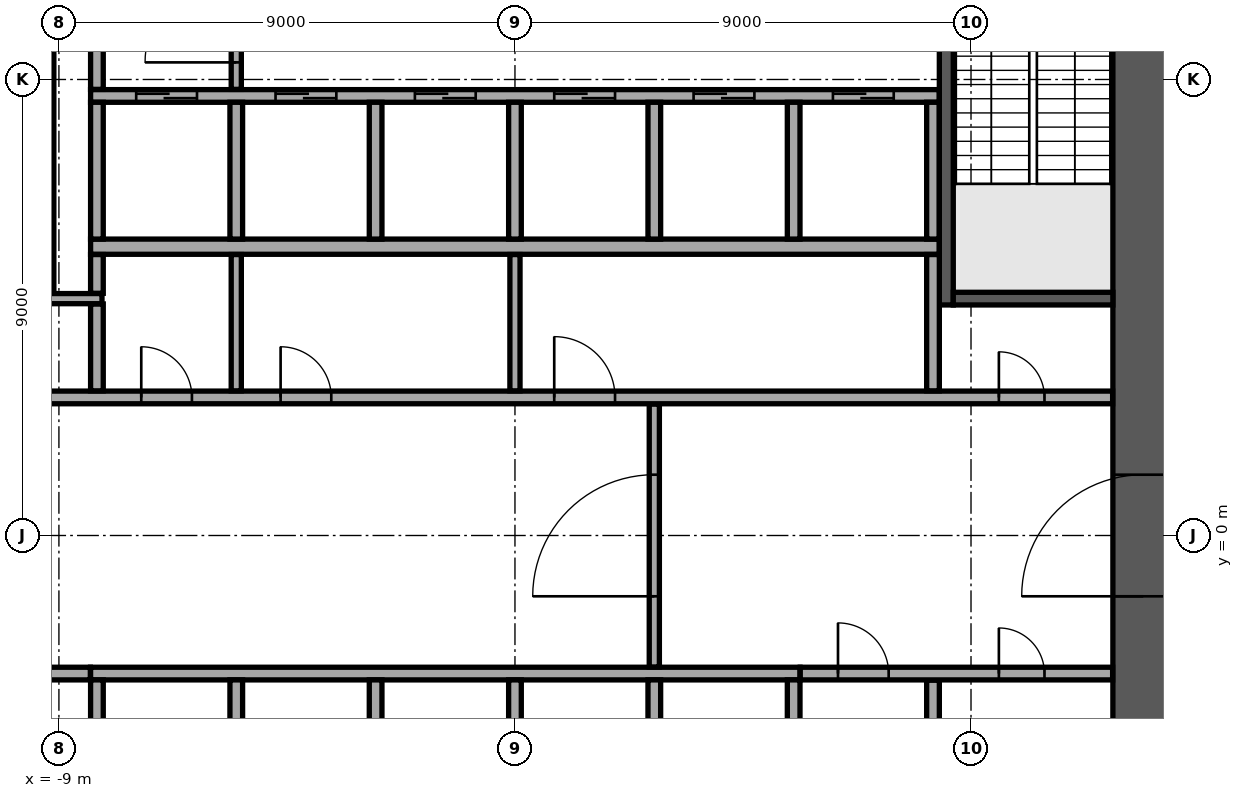
"""IFC4 building model, lengths in metres.
Left out: names, types, materials, properties, quantities, classifications, styles, units other than length and angle.
Written with IfcOpenShell. Run it as: python <this file> out.ifc"""

import sys

from ifc_helpers import new_model, si_unit, direction, frame, frame_2d, origin, place, context, subcontext, project, spatial, rectangle, extrude, element, fill, save


model = new_model("IFC4")
c1 = context("Model", 3, precision=1e-05, world=origin(), true_north=direction((0.0, 1.0)))
c2 = subcontext(c1, "Body", "Model", "MODEL_VIEW")
j1 = project(units=[si_unit("LENGTHUNIT", "METRE"), si_unit("PLANEANGLEUNIT", "RADIAN")], contexts=[c1])
p1 = place(None, origin())
s1 = spatial("IfcSite", under=j1, at=p1, CompositionType="ELEMENT")
p2 = place(p1, origin())
s2 = spatial("IfcBuilding", under=s1, at=p2, CompositionType="ELEMENT")
p3 = place(p2, frame((0.0, 0.0, 27.3)))
s3 = spatial("IfcBuildingStorey", under=s2, at=p3, CompositionType="ELEMENT", Elevation=27.3)
p4 = place(p3, frame((12.4, -11.8, 0.0), z_axis=(0.0, 0.0, 1.0), x_axis=(0.0, 1.0, 0.0)))
e1 = element("IfcWall", 1, at=p4, inside=s3, PredefinedType="SHEAR", context=c2, shape_type="SweptSolid", body=[
    extrude(rectangle(XDim=23.6, YDim=1.2, at=frame_2d((11.8, 0.0))), origin(), (0.0, 0.0, 1.0), 4.35),
])
p5 = place(p4, frame((10.6, 0.0, 0.0)))
e2 = element("IfcOpeningElement", 2, at=p5, cuts=e1, PredefinedType="OPENING", context=c2, shape_type="SweptSolid", body=[
    extrude(rectangle(XDim=2.4, YDim=2.4, at=frame_2d((1.2, 1.2))), frame((0.0, 0.61, 0.0), z_axis=(0.0, -1.0, 0.0), x_axis=(1.0, 0.0, 0.0)), (0.0, 0.0, 1.0), 1.22),
])
p6 = place(p3, frame((-8.375, 5.7, 0.0), z_axis=(0.0, 0.0, 1.0), x_axis=(1.0, 0.0, 0.0)))
e3 = element("IfcWall", 3, at=p6, inside=s3, PredefinedType="SOLIDWALL", context=c2, shape_type="SweptSolid", body=[
    extrude(rectangle(XDim=16.75, YDim=0.3, at=frame_2d((8.375, 0.0))), origin(), (0.0, 0.0, 1.0), 4.35),
])
p7 = place(p3, frame((-8.375, 8.675, 0.0), z_axis=(0.0, 0.0, 1.0), x_axis=(1.0, 0.0, 0.0)))
e4 = element("IfcWall", 4, at=p7, inside=s3, PredefinedType="SOLIDWALL", context=c2, shape_type="SweptSolid", body=[
    extrude(rectangle(XDim=16.75, YDim=0.25, at=frame_2d((8.375, 0.0))), origin(), (0.0, 0.0, 1.0), 4.35),
])
p8 = place(p7, frame((0.9, 0.0, 0.0)))
e5 = element("IfcOpeningElement", 5, at=p8, cuts=e4, PredefinedType="OPENING", context=c2, shape_type="SweptSolid", body=[
    extrude(rectangle(XDim=1.2, YDim=2.1, at=frame_2d((0.6, 1.05))), frame((0.0, 0.135, 0.0), z_axis=(0.0, -1.0, 0.0), x_axis=(1.0, 0.0, 0.0)), (0.0, 0.0, 1.0), 0.27),
])
p9 = place(p7, frame((3.65, 0.0, 0.0)))
e6 = element("IfcOpeningElement", 6, at=p9, cuts=e4, PredefinedType="OPENING", context=c2, shape_type="SweptSolid", body=[
    extrude(rectangle(XDim=1.2, YDim=2.1, at=frame_2d((0.6, 1.05))), frame((0.0, 0.135, 0.0), z_axis=(0.0, -1.0, 0.0), x_axis=(1.0, 0.0, 0.0)), (0.0, 0.0, 1.0), 0.27),
])
p10 = place(p7, frame((6.4, 0.0, 0.0)))
e7 = element("IfcOpeningElement", 7, at=p10, cuts=e4, PredefinedType="OPENING", context=c2, shape_type="SweptSolid", body=[
    extrude(rectangle(XDim=1.2, YDim=2.1, at=frame_2d((0.6, 1.05))), frame((0.0, 0.135, 0.0), z_axis=(0.0, -1.0, 0.0), x_axis=(1.0, 0.0, 0.0)), (0.0, 0.0, 1.0), 0.27),
])
p11 = place(p7, frame((9.15, 0.0, 0.0)))
e8 = element("IfcOpeningElement", 8, at=p11, cuts=e4, PredefinedType="OPENING", context=c2, shape_type="SweptSolid", body=[
    extrude(rectangle(XDim=1.2, YDim=2.1, at=frame_2d((0.6, 1.05))), frame((0.0, 0.135, 0.0), z_axis=(0.0, -1.0, 0.0), x_axis=(1.0, 0.0, 0.0)), (0.0, 0.0, 1.0), 0.27),
])
p12 = place(p7, frame((11.9, 0.0, 0.0)))
e9 = element("IfcOpeningElement", 9, at=p12, cuts=e4, PredefinedType="OPENING", context=c2, shape_type="SweptSolid", body=[
    extrude(rectangle(XDim=1.2, YDim=2.1, at=frame_2d((0.6, 1.05))), frame((0.0, 0.135, 0.0), z_axis=(0.0, -1.0, 0.0), x_axis=(1.0, 0.0, 0.0)), (0.0, 0.0, 1.0), 0.27),
])
p13 = place(p7, frame((14.65, 0.0, 0.0)))
e10 = element("IfcOpeningElement", 10, at=p13, cuts=e4, PredefinedType="OPENING", context=c2, shape_type="SweptSolid", body=[
    extrude(rectangle(XDim=1.2, YDim=2.1, at=frame_2d((0.6, 1.05))), frame((0.0, 0.135, 0.0), z_axis=(0.0, -1.0, 0.0), x_axis=(1.0, 0.0, 0.0)), (0.0, 0.0, 1.0), 0.27),
])
for number, where, z_axis, x_axis in (
    (11, (-8.25, 5.85, 0.0), (0.0, 0.0, 1.0), (0.0, 1.0, 0.0)),
    (12, (-5.5, 5.85, 0.0), (0.0, 0.0, 1.0), (0.0, 1.0, 0.0)),
    (13, (-2.75, 5.85, 0.0), (0.0, 0.0, 1.0), (0.0, 1.0, 0.0)),
    (14, (0.0, 5.85, 0.0), (0.0, 0.0, 1.0), (0.0, 1.0, 0.0)),
    (15, (2.75, 5.85, 0.0), (0.0, 0.0, 1.0), (0.0, 1.0, 0.0)),
    (16, (5.5, 5.85, 0.0), (0.0, 0.0, 1.0), (0.0, 1.0, 0.0)),
    (17, (8.25, 5.85, 0.0), (0.0, 0.0, 1.0), (0.0, 1.0, 0.0)),
):
    element("IfcWall", number, at=place(p3, frame(where, z_axis=z_axis, x_axis=x_axis)), inside=s3, PredefinedType="SOLIDWALL", context=c2, shape_type="SweptSolid", body=[
        extrude(rectangle(XDim=2.7, YDim=0.25, at=frame_2d((1.35, 0.0))), origin(), (0.0, 0.0, 1.0), 4.35),
    ])
p14 = place(p3, frame((-8.375, -2.725, 0.0), z_axis=(0.0, 0.0, 1.0), x_axis=(1.0, 0.0, 0.0)))
e18 = element("IfcWall", 18, at=p14, inside=s3, PredefinedType="SOLIDWALL", context=c2, shape_type="SweptSolid", body=[
    extrude(rectangle(XDim=14.0, YDim=0.25, at=frame_2d((7.0, 0.0))), origin(), (0.0, 0.0, 1.0), 4.35),
])
for number, where, z_axis, x_axis in (
    (19, (-8.25, -5.55, 0.0), (0.0, 0.0, 1.0), (0.0, 1.0, 0.0)),
    (20, (-5.5, -5.55, 0.0), (0.0, 0.0, 1.0), (0.0, 1.0, 0.0)),
    (21, (-2.75, -5.55, 0.0), (0.0, 0.0, 1.0), (0.0, 1.0, 0.0)),
    (22, (0.0, -5.55, 0.0), (0.0, 0.0, 1.0), (0.0, 1.0, 0.0)),
    (23, (2.75, -5.55, 0.0), (0.0, 0.0, 1.0), (0.0, 1.0, 0.0)),
    (24, (5.5, -5.55, 0.0), (0.0, 0.0, 1.0), (0.0, 1.0, 0.0)),
):
    element("IfcWall", number, at=place(p3, frame(where, z_axis=z_axis, x_axis=x_axis)), inside=s3, PredefinedType="SOLIDWALL", context=c2, shape_type="SweptSolid", body=[
        extrude(rectangle(XDim=2.7, YDim=0.25, at=frame_2d((1.35, 0.0))), origin(), (0.0, 0.0, 1.0), 4.35),
    ])
p15 = place(p3, frame((8.512, 4.55, 0.0), z_axis=(0.0, 0.0, 1.0), x_axis=(0.0, 1.0, 0.0)))
e25 = element("IfcWall", 25, at=p15, inside=s3, PredefinedType="SOLIDWALL", context=c2, shape_type="SweptSolid", body=[
    extrude(rectangle(XDim=7.25, YDim=0.275, at=frame_2d((3.625, 0.0))), origin(), (0.0, 0.0, 1.0), 4.35),
])
p16 = place(p15, frame((6.0, 0.0, 0.0)))
e26 = element("IfcOpeningElement", 26, at=p16, cuts=e25, PredefinedType="OPENING", context=c2, shape_type="SweptSolid", body=[
    extrude(rectangle(XDim=1.0, YDim=2.1, at=frame_2d((0.5, 1.05))), frame((0.0, 0.147, 0.0), z_axis=(0.0, -1.0, 0.0), x_axis=(1.0, 0.0, 0.0)), (0.0, 0.0, 1.0), 0.295),
])
p17 = place(p3, frame((8.65, 4.675, 0.0), z_axis=(0.0, 0.0, 1.0), x_axis=(1.0, 0.0, 0.0)))
e27 = element("IfcWall", 27, at=p17, inside=s3, PredefinedType="SOLIDWALL", context=c2, shape_type="SweptSolid", body=[
    extrude(rectangle(XDim=3.15, YDim=0.25, at=frame_2d((1.575, 0.0))), origin(), (0.0, 0.0, 1.0), 4.35),
])
p18 = place(p3, frame((8.25, -5.545, 0.0), z_axis=(0.0, 0.0, 1.0), x_axis=(0.0, 1.0, 0.0)))
e28 = element("IfcWall", 28, at=p18, inside=s3, PredefinedType="PARTITIONING", context=c2, shape_type="SweptSolid", body=[
    extrude(rectangle(XDim=2.69, YDim=0.25, at=frame_2d((1.345, 0.0))), origin(), (0.0, 0.0, 1.0), 4.35),
])
p19 = place(p3, frame((-11.795, -2.725, 0.0), z_axis=(0.0, 0.0, 1.0), x_axis=(1.0, 0.0, 0.0)))
e29 = element("IfcWall", 29, at=p19, inside=s3, PredefinedType="PARTITIONING", context=c2, shape_type="SweptSolid", body=[
    extrude(rectangle(XDim=3.415, YDim=0.25, at=frame_2d((1.708, 0.0))), origin(), (0.0, 0.0, 1.0), 4.35),
])
p20 = place(p19, frame((1.295, 0.0, 0.0)))
e30 = element("IfcOpeningElement", 30, at=p20, cuts=e29, PredefinedType="OPENING", context=c2, shape_type="SweptSolid", body=[
    extrude(rectangle(XDim=1.0, YDim=2.1, at=frame_2d((0.5, 1.05))), frame((0.0, 0.135, 0.0), z_axis=(0.0, -1.0, 0.0), x_axis=(1.0, 0.0, 0.0)), (0.0, 0.0, 1.0), 0.27),
])
p21 = place(p3, frame((5.63, -2.725, 0.0), z_axis=(0.0, 0.0, 1.0), x_axis=(1.0, 0.0, 0.0)))
e31 = element("IfcWall", 31, at=p21, inside=s3, PredefinedType="PARTITIONING", context=c2, shape_type="SweptSolid", body=[
    extrude(rectangle(XDim=6.165, YDim=0.25, at=frame_2d((3.083, 0.0))), origin(), (0.0, 0.0, 1.0), 4.35),
])
p22 = place(p21, frame((0.745, 0.0, 0.0)))
e32 = element("IfcOpeningElement", 32, at=p22, cuts=e31, PredefinedType="OPENING", context=c2, shape_type="SweptSolid", body=[
    extrude(rectangle(XDim=1.0, YDim=2.1, at=frame_2d((0.5, 1.05))), frame((0.0, 0.135, 0.0), z_axis=(0.0, -1.0, 0.0), x_axis=(1.0, 0.0, 0.0)), (0.0, 0.0, 1.0), 0.27),
])
p23 = place(p21, frame((3.92, 0.0, 0.0)))
e33 = element("IfcOpeningElement", 33, at=p23, cuts=e31, PredefinedType="OPENING", context=c2, shape_type="SweptSolid", body=[
    extrude(rectangle(XDim=0.9, YDim=2.1, at=frame_2d((0.45, 1.05))), frame((0.0, 0.135, 0.0), z_axis=(0.0, -1.0, 0.0), x_axis=(1.0, 0.0, 0.0)), (0.0, 0.0, 1.0), 0.27),
])
p24 = place(p3, frame((2.75, -2.595, 0.0), z_axis=(0.0, 0.0, 1.0), x_axis=(0.0, 1.0, 0.0)))
e34 = element("IfcWall", 34, at=p24, inside=s3, PredefinedType="PARTITIONING", context=c2, shape_type="SweptSolid", body=[
    extrude(rectangle(XDim=5.19, YDim=0.2, at=frame_2d((2.595, 0.0))), origin(), (0.0, 0.0, 1.0), 4.35),
])
p25 = place(p24, frame((1.395, 0.0, 0.0)))
e35 = element("IfcOpeningElement", 35, at=p25, cuts=e34, PredefinedType="OPENING", context=c2, shape_type="SweptSolid", body=[
    extrude(rectangle(XDim=2.4, YDim=2.4, at=frame_2d((1.2, 1.2))), frame((0.0, 0.11, 0.0), z_axis=(0.0, -1.0, 0.0), x_axis=(1.0, 0.0, 0.0)), (0.0, 0.0, 1.0), 0.22),
])
p26 = place(p3, frame((-11.795, 2.725, 0.0), z_axis=(0.0, 0.0, 1.0), x_axis=(1.0, 0.0, 0.0)))
e36 = element("IfcWall", 36, at=p26, inside=s3, PredefinedType="PARTITIONING", context=c2, shape_type="SweptSolid", body=[
    extrude(rectangle(XDim=23.59, YDim=0.25, at=frame_2d((11.795, 0.0))), origin(), (0.0, 0.0, 1.0), 4.35),
])
p27 = place(p26, frame((21.345, 0.0, 0.0)))
e37 = element("IfcOpeningElement", 37, at=p27, cuts=e36, PredefinedType="OPENING", context=c2, shape_type="SweptSolid", body=[
    extrude(rectangle(XDim=0.9, YDim=2.1, at=frame_2d((0.45, 1.05))), frame((0.0, 0.135, 0.0), z_axis=(0.0, -1.0, 0.0), x_axis=(1.0, 0.0, 0.0)), (0.0, 0.0, 1.0), 0.27),
])
p28 = place(p26, frame((1.345, 0.0, 0.0)))
e38 = element("IfcOpeningElement", 38, at=p28, cuts=e36, PredefinedType="OPENING", context=c2, shape_type="SweptSolid", body=[
    extrude(rectangle(XDim=0.9, YDim=2.1, at=frame_2d((0.45, 1.05))), frame((0.0, 0.135, 0.0), z_axis=(0.0, -1.0, 0.0), x_axis=(1.0, 0.0, 0.0)), (0.0, 0.0, 1.0), 0.27),
])
p29 = place(p26, frame((4.42, 0.0, 0.0)))
e39 = element("IfcOpeningElement", 39, at=p29, cuts=e36, PredefinedType="OPENING", context=c2, shape_type="SweptSolid", body=[
    extrude(rectangle(XDim=1.0, YDim=2.1, at=frame_2d((0.5, 1.05))), frame((0.0, 0.135, 0.0), z_axis=(0.0, -1.0, 0.0), x_axis=(1.0, 0.0, 0.0)), (0.0, 0.0, 1.0), 0.27),
])
p30 = place(p26, frame((7.17, 0.0, 0.0)))
e40 = element("IfcOpeningElement", 40, at=p30, cuts=e36, PredefinedType="OPENING", context=c2, shape_type="SweptSolid", body=[
    extrude(rectangle(XDim=1.0, YDim=2.1, at=frame_2d((0.5, 1.05))), frame((0.0, 0.135, 0.0), z_axis=(0.0, -1.0, 0.0), x_axis=(1.0, 0.0, 0.0)), (0.0, 0.0, 1.0), 0.27),
])
p31 = place(p26, frame((12.57, 0.0, 0.0)))
e41 = element("IfcOpeningElement", 41, at=p31, cuts=e36, PredefinedType="OPENING", context=c2, shape_type="SweptSolid", body=[
    extrude(rectangle(XDim=1.2, YDim=2.1, at=frame_2d((0.6, 1.05))), frame((0.0, 0.135, 0.0), z_axis=(0.0, -1.0, 0.0), x_axis=(1.0, 0.0, 0.0)), (0.0, 0.0, 1.0), 0.27),
])
p32 = place(p3, frame((-8.25, 2.855, 0.0), z_axis=(0.0, 0.0, 1.0), x_axis=(0.0, 1.0, 0.0)))
e42 = element("IfcWall", 42, at=p32, inside=s3, PredefinedType="PARTITIONING", context=c2, shape_type="SweptSolid", body=[
    extrude(rectangle(XDim=1.715, YDim=0.25, at=frame_2d((0.857, 0.0))), origin(), (0.0, 0.0, 1.0), 4.35),
])
for number, where, z_axis, x_axis in (
    (43, (-5.5, 2.855, 0.0), (0.0, 0.0, 1.0), (0.0, 1.0, 0.0)),
    (44, (0.0, 2.855, 0.0), (0.0, 0.0, 1.0), (0.0, 1.0, 0.0)),
):
    element("IfcWall", number, at=place(p3, frame(where, z_axis=z_axis, x_axis=x_axis)), inside=s3, PredefinedType="PARTITIONING", context=c2, shape_type="SweptSolid", body=[
        extrude(rectangle(XDim=2.69, YDim=0.2, at=frame_2d((1.345, 0.0))), origin(), (0.0, 0.0, 1.0), 4.35),
    ])
p33 = place(p3, frame((8.25, 2.855, 0.0), z_axis=(0.0, 0.0, 1.0), x_axis=(0.0, 1.0, 0.0)))
e45 = element("IfcWall", 45, at=p33, inside=s3, PredefinedType="PARTITIONING", context=c2, shape_type="SweptSolid", body=[
    extrude(rectangle(XDim=2.69, YDim=0.25, at=frame_2d((1.345, 0.0))), origin(), (0.0, 0.0, 1.0), 4.35),
])
p34 = place(p3, frame((-11.795, 4.675, 0.0), z_axis=(0.0, 0.0, 1.0), x_axis=(1.0, 0.0, 0.0)))
e46 = element("IfcWall", 46, at=p34, inside=s3, PredefinedType="PARTITIONING", context=c2, shape_type="SweptSolid", body=[
    extrude(rectangle(XDim=3.645, YDim=0.2, at=frame_2d((1.823, 0.0))), origin(), (0.0, 0.0, 1.0), 4.35),
])
p35 = place(p3, frame((-9.2, 4.78, 0.0), z_axis=(0.0, 0.0, 1.0), x_axis=(0.0, 1.0, 0.0)))
e47 = element("IfcWall", 47, at=p35, inside=s3, PredefinedType="PARTITIONING", context=c2, shape_type="SweptSolid", body=[
    extrude(rectangle(XDim=7.015, YDim=0.2, at=frame_2d((3.507, 0.0))), origin(), (0.0, 0.0, 1.0), 4.35),
])
p36 = place(p35, frame((2.92, 0.0, 0.0)))
e48 = element("IfcOpeningElement", 48, at=p36, cuts=e47, PredefinedType="OPENING", context=c2, shape_type="SweptSolid", body=[
    extrude(rectangle(XDim=1.0, YDim=2.1, at=frame_2d((0.5, 1.05))), frame((0.0, 0.11, 0.0), z_axis=(0.0, -1.0, 0.0), x_axis=(1.0, 0.0, 0.0)), (0.0, 0.0, 1.0), 0.22),
])
p37 = place(p3, frame((-8.25, 4.78, 0.0), z_axis=(0.0, 0.0, 1.0), x_axis=(0.0, 1.0, 0.0)))
e49 = element("IfcWall", 49, at=p37, inside=s3, PredefinedType="PARTITIONING", context=c2, shape_type="SweptSolid", body=[
    extrude(rectangle(XDim=0.765, YDim=0.25, at=frame_2d((0.382, 0.0))), origin(), (0.0, 0.0, 1.0), 4.35),
])
p38 = place(p3, frame((-8.25, 8.805, 0.0), z_axis=(0.0, 0.0, 1.0), x_axis=(0.0, 1.0, 0.0)))
e50 = element("IfcWall", 50, at=p38, inside=s3, PredefinedType="PARTITIONING", context=c2, shape_type="SweptSolid", body=[
    extrude(rectangle(XDim=2.99, YDim=0.25, at=frame_2d((1.495, 0.0))), origin(), (0.0, 0.0, 1.0), 4.35),
])
p39 = place(p38, frame((0.895, 0.0, 0.0)))
e51 = element("IfcOpeningElement", 51, at=p39, cuts=e50, PredefinedType="OPENING", context=c2, shape_type="SweptSolid", body=[
    extrude(rectangle(XDim=1.0, YDim=2.1, at=frame_2d((0.5, 1.05))), frame((0.0, 0.135, 0.0), z_axis=(0.0, -1.0, 0.0), x_axis=(1.0, 0.0, 0.0)), (0.0, 0.0, 1.0), 0.27),
])
p40 = place(p3, frame((-5.5, 8.805, 0.0), z_axis=(0.0, 0.0, 1.0), x_axis=(0.0, 1.0, 0.0)))
e52 = element("IfcWall", 52, at=p40, inside=s3, PredefinedType="PARTITIONING", context=c2, shape_type="SweptSolid", body=[
    extrude(rectangle(XDim=2.99, YDim=0.2, at=frame_2d((1.495, 0.0))), origin(), (0.0, 0.0, 1.0), 4.35),
])
p41 = place(p40, frame((0.532, 0.0, 0.0)))
e53 = element("IfcOpeningElement", 53, at=p41, cuts=e52, PredefinedType="OPENING", context=c2, shape_type="SweptSolid", body=[
    extrude(rectangle(XDim=1.8, YDim=2.1, at=frame_2d((0.9, 1.05))), frame((0.0, 0.11, 0.0), z_axis=(0.0, -1.0, 0.0), x_axis=(1.0, 0.0, 0.0)), (0.0, 0.0, 1.0), 0.22),
])
p42 = place(p5, origin())
e54 = element("IfcDoor", 54, at=p42, inside=s3, OperationType="SINGLE_SWING_LEFT", PredefinedType="DOOR", context=c2, shape_type="SweptSolid", body=[
    extrude(rectangle(XDim=2.4, YDim=2.4, at=frame_2d((1.2, 1.2))), frame((0.0, 0.025, 0.0), z_axis=(0.0, -1.0, 0.0), x_axis=(1.0, 0.0, 0.0)), (0.0, 0.0, 1.0), 0.05),
])
fill(e2, e54)
p43 = place(p8, origin())
e55 = element("IfcDoor", 55, at=p43, inside=s3, OperationType="DOUBLE_DOOR_SLIDING", PredefinedType="DOOR", context=c2, shape_type="SweptSolid", body=[
    extrude(rectangle(XDim=1.2, YDim=2.1, at=frame_2d((0.6, 1.05))), frame((0.0, 0.025, 0.0), z_axis=(0.0, -1.0, 0.0), x_axis=(1.0, 0.0, 0.0)), (0.0, 0.0, 1.0), 0.05),
])
fill(e5, e55)
p44 = place(p9, origin())
e56 = element("IfcDoor", 56, at=p44, inside=s3, OperationType="DOUBLE_DOOR_SLIDING", PredefinedType="DOOR", context=c2, shape_type="SweptSolid", body=[
    extrude(rectangle(XDim=1.2, YDim=2.1, at=frame_2d((0.6, 1.05))), frame((0.0, 0.025, 0.0), z_axis=(0.0, -1.0, 0.0), x_axis=(1.0, 0.0, 0.0)), (0.0, 0.0, 1.0), 0.05),
])
fill(e6, e56)
p45 = place(p10, origin())
e57 = element("IfcDoor", 57, at=p45, inside=s3, OperationType="DOUBLE_DOOR_SLIDING", PredefinedType="DOOR", context=c2, shape_type="SweptSolid", body=[
    extrude(rectangle(XDim=1.2, YDim=2.1, at=frame_2d((0.6, 1.05))), frame((0.0, 0.025, 0.0), z_axis=(0.0, -1.0, 0.0), x_axis=(1.0, 0.0, 0.0)), (0.0, 0.0, 1.0), 0.05),
])
fill(e7, e57)
p46 = place(p11, origin())
e58 = element("IfcDoor", 58, at=p46, inside=s3, OperationType="DOUBLE_DOOR_SLIDING", PredefinedType="DOOR", context=c2, shape_type="SweptSolid", body=[
    extrude(rectangle(XDim=1.2, YDim=2.1, at=frame_2d((0.6, 1.05))), frame((0.0, 0.025, 0.0), z_axis=(0.0, -1.0, 0.0), x_axis=(1.0, 0.0, 0.0)), (0.0, 0.0, 1.0), 0.05),
])
fill(e8, e58)
p47 = place(p12, origin())
e59 = element("IfcDoor", 59, at=p47, inside=s3, OperationType="DOUBLE_DOOR_SLIDING", PredefinedType="DOOR", context=c2, shape_type="SweptSolid", body=[
    extrude(rectangle(XDim=1.2, YDim=2.1, at=frame_2d((0.6, 1.05))), frame((0.0, 0.025, 0.0), z_axis=(0.0, -1.0, 0.0), x_axis=(1.0, 0.0, 0.0)), (0.0, 0.0, 1.0), 0.05),
])
fill(e9, e59)
p48 = place(p13, origin())
e60 = element("IfcDoor", 60, at=p48, inside=s3, OperationType="DOUBLE_DOOR_SLIDING", PredefinedType="DOOR", context=c2, shape_type="SweptSolid", body=[
    extrude(rectangle(XDim=1.2, YDim=2.1, at=frame_2d((0.6, 1.05))), frame((0.0, 0.025, 0.0), z_axis=(0.0, -1.0, 0.0), x_axis=(1.0, 0.0, 0.0)), (0.0, 0.0, 1.0), 0.05),
])
fill(e10, e60)
p49 = place(p22, origin())
e61 = element("IfcDoor", 61, at=p49, inside=s3, OperationType="SINGLE_SWING_LEFT", PredefinedType="DOOR", context=c2, shape_type="SweptSolid", body=[
    extrude(rectangle(XDim=1.0, YDim=2.1, at=frame_2d((0.5, 1.05))), frame((0.0, 0.025, 0.0), z_axis=(0.0, -1.0, 0.0), x_axis=(1.0, 0.0, 0.0)), (0.0, 0.0, 1.0), 0.05),
])
fill(e32, e61)
p50 = place(p27, origin())
e62 = element("IfcDoor", 62, at=p50, inside=s3, OperationType="SINGLE_SWING_LEFT", PredefinedType="DOOR", context=c2, shape_type="SweptSolid", body=[
    extrude(rectangle(XDim=0.9, YDim=2.1, at=frame_2d((0.45, 1.05))), frame((0.0, 0.025, 0.0), z_axis=(0.0, -1.0, 0.0), x_axis=(1.0, 0.0, 0.0)), (0.0, 0.0, 1.0), 0.05),
])
fill(e37, e62)
p51 = place(p23, origin())
e63 = element("IfcDoor", 63, at=p51, inside=s3, OperationType="SINGLE_SWING_LEFT", PredefinedType="DOOR", context=c2, shape_type="SweptSolid", body=[
    extrude(rectangle(XDim=0.9, YDim=2.1, at=frame_2d((0.45, 1.05))), frame((0.0, 0.025, 0.0), z_axis=(0.0, -1.0, 0.0), x_axis=(1.0, 0.0, 0.0)), (0.0, 0.0, 1.0), 0.05),
])
fill(e33, e63)
p52 = place(p29, origin())
e64 = element("IfcDoor", 64, at=p52, inside=s3, OperationType="SINGLE_SWING_LEFT", PredefinedType="DOOR", context=c2, shape_type="SweptSolid", body=[
    extrude(rectangle(XDim=1.0, YDim=2.1, at=frame_2d((0.5, 1.05))), frame((0.0, 0.025, 0.0), z_axis=(0.0, -1.0, 0.0), x_axis=(1.0, 0.0, 0.0)), (0.0, 0.0, 1.0), 0.05),
])
fill(e39, e64)
p53 = place(p30, origin())
e65 = element("IfcDoor", 65, at=p53, inside=s3, OperationType="SINGLE_SWING_LEFT", PredefinedType="DOOR", context=c2, shape_type="SweptSolid", body=[
    extrude(rectangle(XDim=1.0, YDim=2.1, at=frame_2d((0.5, 1.05))), frame((0.0, 0.025, 0.0), z_axis=(0.0, -1.0, 0.0), x_axis=(1.0, 0.0, 0.0)), (0.0, 0.0, 1.0), 0.05),
])
fill(e40, e65)
p54 = place(p31, origin())
e66 = element("IfcDoor", 66, at=p54, inside=s3, OperationType="SINGLE_SWING_LEFT", PredefinedType="DOOR", context=c2, shape_type="SweptSolid", body=[
    extrude(rectangle(XDim=1.2, YDim=2.1, at=frame_2d((0.6, 1.05))), frame((0.0, 0.025, 0.0), z_axis=(0.0, -1.0, 0.0), x_axis=(1.0, 0.0, 0.0)), (0.0, 0.0, 1.0), 0.05),
])
fill(e41, e66)
p55 = place(p25, origin())
e67 = element("IfcDoor", 67, at=p55, inside=s3, OperationType="SINGLE_SWING_LEFT", PredefinedType="DOOR", context=c2, shape_type="SweptSolid", body=[
    extrude(rectangle(XDim=2.4, YDim=2.4, at=frame_2d((1.2, 1.2))), frame((0.0, 0.025, 0.0), z_axis=(0.0, -1.0, 0.0), x_axis=(1.0, 0.0, 0.0)), (0.0, 0.0, 1.0), 0.05),
])
fill(e35, e67)
p56 = place(p41, origin())
e68 = element("IfcDoor", 68, at=p56, inside=s3, OperationType="SINGLE_SWING_LEFT", PredefinedType="DOOR", context=c2, shape_type="SweptSolid", body=[
    extrude(rectangle(XDim=1.8, YDim=2.1, at=frame_2d((0.9, 1.05))), frame((0.0, 0.025, 0.0), z_axis=(0.0, -1.0, 0.0), x_axis=(1.0, 0.0, 0.0)), (0.0, 0.0, 1.0), 0.05),
])
fill(e53, e68)
save(model, sys.argv[1])
